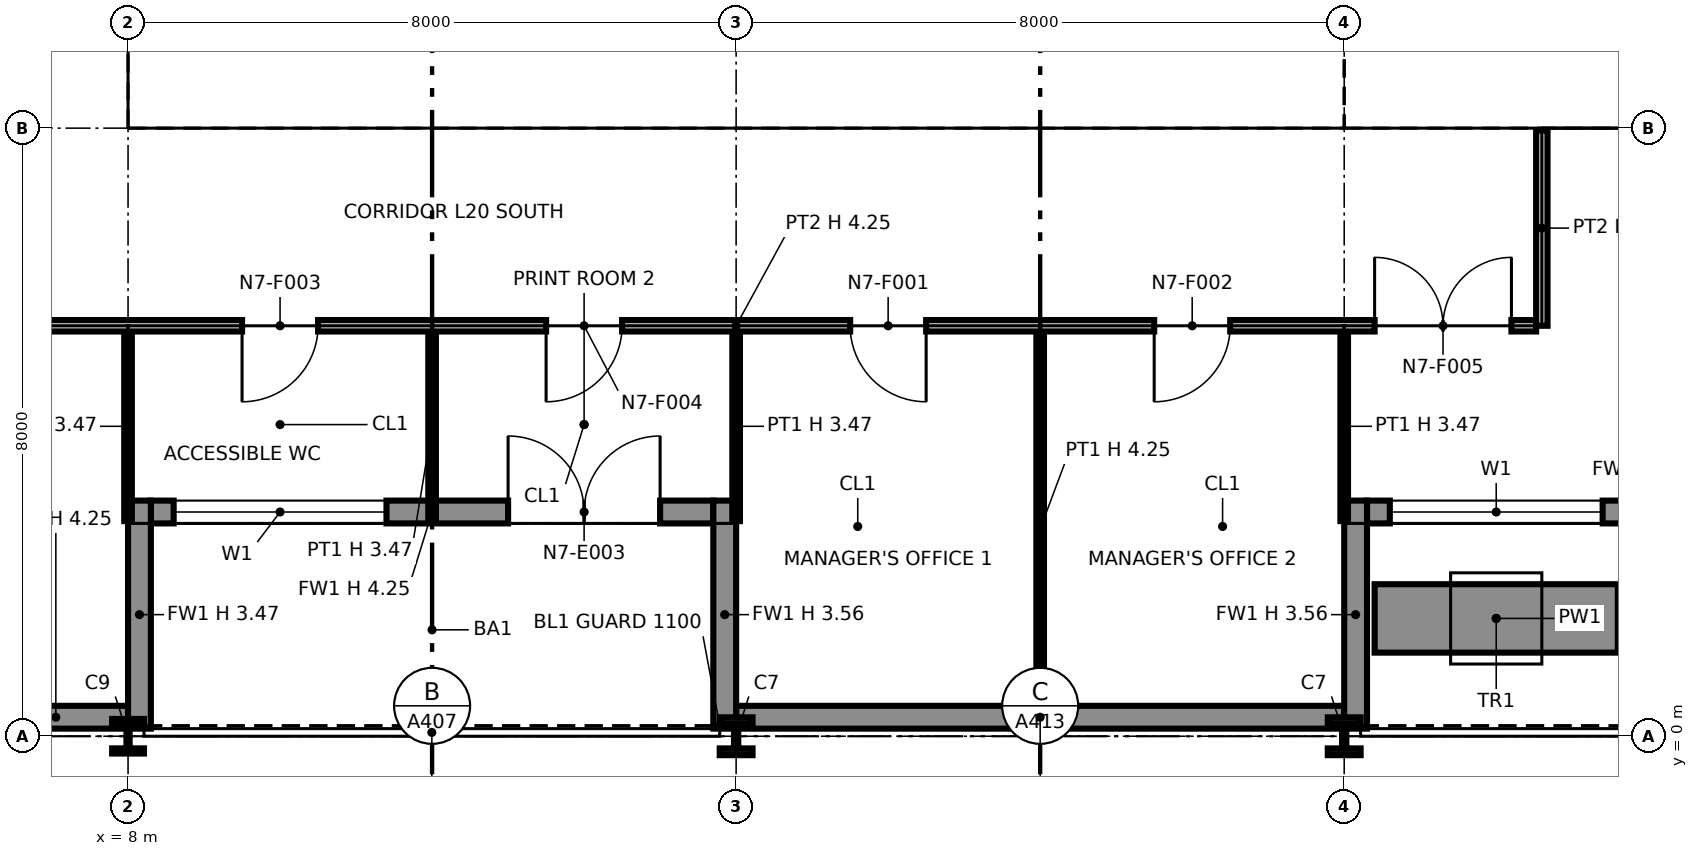
"""IFC4 building model, lengths in metres.
Left out: names, types, materials, properties, quantities, classifications, styles, units other than length and angle.
Written with IfcOpenShell. Run it as: python <this file> out.ifc"""

import sys

from ifc_helpers import new_model, si_unit, direction, frame, frame_2d, origin, origin_2d, place, context, subcontext, project, spatial, polyline, rectangle, i_section, outline, extrude, element, fill, save


model = new_model("IFC4")
c1 = context("Model", 3, precision=1e-05, world=origin(), true_north=direction((0.0, 1.0)))
c2 = subcontext(c1, "Body", "Model", "MODEL_VIEW")
j1 = project(units=[si_unit("LENGTHUNIT", "METRE"), si_unit("PLANEANGLEUNIT", "RADIAN")], contexts=[c1])
p1 = place(None, origin())
s1 = spatial("IfcSite", under=j1, at=p1, CompositionType="ELEMENT")
p2 = place(p1, origin())
s2 = spatial("IfcBuilding", under=s1, at=p2, CompositionType="ELEMENT")
p3 = place(p2, frame((0.0, 0.0, 105.2)))
s3 = spatial("IfcBuildingStorey", under=s2, at=p3, CompositionType="ELEMENT", Elevation=105.2)
p4 = place(p3, frame((8.0, 0.0, 0.0), z_axis=(0.0, 0.0, 1.0), x_axis=(1.0, 0.0, 0.0)))
e1 = element("IfcColumn", 1, at=p4, inside=s3, PredefinedType="COLUMN", context=c2, shape_type="SweptSolid", body=[
    extrude(i_section(OverallWidth=0.419, OverallDepth=0.455, WebThickness=0.042, FlangeThickness=0.068, at=origin_2d()), origin(), (0.0, 0.0, 1.0), 4.25),
])
p5 = place(p3, frame((8.0, 8.0, 0.0), z_axis=(0.0, 0.0, 1.0), x_axis=(1.0, 0.0, 0.0)))
e2 = element("IfcColumn", 2, at=p5, inside=s3, PredefinedType="COLUMN", context=c2, shape_type="SweptSolid", body=[
    extrude(i_section(OverallWidth=0.406, OverallDepth=0.417, WebThickness=0.03, FlangeThickness=0.048, at=origin_2d()), origin(), (0.0, 0.0, 1.0), 4.25),
])
p6 = place(p3, frame((16.0, 0.0, 0.0), z_axis=(0.0, 0.0, 1.0), x_axis=(1.0, 0.0, 0.0)))
e3 = element("IfcColumn", 3, at=p6, inside=s3, PredefinedType="COLUMN", context=c2, shape_type="SweptSolid", body=[
    extrude(i_section(OverallWidth=0.432, OverallDepth=0.498, WebThickness=0.056, FlangeThickness=0.089, at=origin_2d()), origin(), (0.0, 0.0, 1.0), 4.25),
])
p7 = place(p3, frame((16.0, 8.0, 0.0), z_axis=(0.0, 0.0, 1.0), x_axis=(1.0, 0.0, 0.0)))
e4 = element("IfcColumn", 4, at=p7, inside=s3, PredefinedType="COLUMN", context=c2, shape_type="SweptSolid", body=[
    extrude(i_section(OverallWidth=0.406, OverallDepth=0.417, WebThickness=0.03, FlangeThickness=0.048, at=origin_2d()), origin(), (0.0, 0.0, 1.0), 4.25),
])
p8 = place(p3, frame((24.0, 0.0, 0.0), z_axis=(0.0, 0.0, 1.0), x_axis=(1.0, 0.0, 0.0)))
e5 = element("IfcColumn", 5, at=p8, inside=s3, PredefinedType="COLUMN", context=c2, shape_type="SweptSolid", body=[
    extrude(i_section(OverallWidth=0.432, OverallDepth=0.498, WebThickness=0.056, FlangeThickness=0.089, at=origin_2d()), origin(), (0.0, 0.0, 1.0), 4.25),
])
p9 = place(p3, frame((24.0, 8.0, 0.0), z_axis=(0.0, 0.0, 1.0), x_axis=(1.0, 0.0, 0.0)))
e6 = element("IfcColumn", 6, at=p9, inside=s3, PredefinedType="COLUMN", context=c2, shape_type="SweptSolid", body=[
    extrude(i_section(OverallWidth=0.411, OverallDepth=0.434, WebThickness=0.036, FlangeThickness=0.057, at=origin_2d()), origin(), (0.0, 0.0, 1.0), 4.25),
])
p10 = place(p3, frame((6.1, 0.25, 0.0), z_axis=(0.0, 0.0, 1.0), x_axis=(1.0, 0.0, 0.0)))
e7 = element("IfcWall", 7, at=p10, inside=s3, PredefinedType="SOLIDWALL", context=c2, shape_type="SweptSolid", body=[
    extrude(rectangle(XDim=1.9, YDim=0.3, at=frame_2d((0.95, 0.0))), origin(), (0.0, 0.0, 1.0), 4.25),
])
p11 = place(p3, frame((8.3, 2.95, 0.0), z_axis=(0.0, 0.0, 1.0), x_axis=(1.0, 0.0, 0.0)))
e8 = element("IfcWall", 8, at=p11, inside=s3, PredefinedType="SOLIDWALL", context=c2, shape_type="SweptSolid", body=[
    extrude(rectangle(XDim=7.4, YDim=0.3, at=frame_2d((3.7, 0.0))), origin(), (0.0, 0.0, 1.0), 4.25),
])
p12 = place(p11, frame((0.3, 0.0, 0.9)))
e9 = element("IfcOpeningElement", 9, at=p12, cuts=e8, PredefinedType="OPENING", context=c2, shape_type="SweptSolid", body=[
    extrude(rectangle(XDim=2.8, YDim=2.2, at=frame_2d((1.4, 1.1))), frame((0.0, 0.16, 0.0), z_axis=(0.0, -1.0, 0.0), x_axis=(1.0, 0.0, 0.0)), (0.0, 0.0, 1.0), 0.32),
])
p13 = place(p11, frame((4.7, 0.0, 0.0)))
e10 = element("IfcOpeningElement", 10, at=p13, cuts=e8, PredefinedType="OPENING", context=c2, shape_type="SweptSolid", body=[
    extrude(rectangle(XDim=2.0, YDim=2.4, at=frame_2d((1.0, 1.2))), frame((0.0, 0.16, 0.0), z_axis=(0.0, -1.0, 0.0), x_axis=(1.0, 0.0, 0.0)), (0.0, 0.0, 1.0), 0.32),
])
p14 = place(p3, frame((8.15, 0.1, 0.0), z_axis=(0.0, 0.0, 1.0), x_axis=(0.0, 1.0, 0.0)))
e11 = element("IfcWall", 11, at=p14, inside=s3, PredefinedType="SOLIDWALL", context=c2, shape_type="SweptSolid", body=[
    extrude(rectangle(XDim=3.0, YDim=0.3, at=frame_2d((1.5, 0.0))), origin(), (0.0, 0.0, 1.0), 3.469),
])
p15 = place(p3, frame((15.85, 0.1, 0.0), z_axis=(0.0, 0.0, 1.0), x_axis=(0.0, 1.0, 0.0)))
e12 = element("IfcWall", 12, at=p15, inside=s3, PredefinedType="SOLIDWALL", context=c2, shape_type="SweptSolid", body=[
    extrude(rectangle(XDim=3.0, YDim=0.3, at=frame_2d((1.5, 0.0))), origin(), (0.0, 0.0, 1.0), 3.556),
])
p16 = place(p3, frame((16.0, 0.25, 0.0), z_axis=(0.0, 0.0, 1.0), x_axis=(1.0, 0.0, 0.0)))
e13 = element("IfcWall", 13, at=p16, inside=s3, PredefinedType="SOLIDWALL", context=c2, shape_type="SweptSolid", body=[
    extrude(rectangle(XDim=8.0, YDim=0.3, at=frame_2d((4.0, 0.0))), origin(), (0.0, 0.0, 1.0), 4.25),
])
p17 = place(p3, frame((24.3, 2.95, 0.0), z_axis=(0.0, 0.0, 1.0), x_axis=(1.0, 0.0, 0.0)))
e14 = element("IfcWall", 14, at=p17, inside=s3, PredefinedType="SOLIDWALL", context=c2, shape_type="SweptSolid", body=[
    extrude(rectangle(XDim=7.4, YDim=0.3, at=frame_2d((3.7, 0.0))), origin(), (0.0, 0.0, 1.0), 4.25),
])
p18 = place(p17, frame((0.3, 0.0, 0.9)))
e15 = element("IfcOpeningElement", 15, at=p18, cuts=e14, PredefinedType="OPENING", context=c2, shape_type="SweptSolid", body=[
    extrude(rectangle(XDim=2.8, YDim=2.2, at=frame_2d((1.4, 1.1))), frame((0.0, 0.16, 0.0), z_axis=(0.0, -1.0, 0.0), x_axis=(1.0, 0.0, 0.0)), (0.0, 0.0, 1.0), 0.32),
])
p19 = place(p17, frame((4.7, 0.0, 0.0)))
e16 = element("IfcOpeningElement", 16, at=p19, cuts=e14, PredefinedType="OPENING", context=c2, shape_type="SweptSolid", body=[
    extrude(rectangle(XDim=2.0, YDim=2.4, at=frame_2d((1.0, 1.2))), frame((0.0, 0.16, 0.0), z_axis=(0.0, -1.0, 0.0), x_axis=(1.0, 0.0, 0.0)), (0.0, 0.0, 1.0), 0.32),
])
p20 = place(p3, frame((24.15, 0.1, 0.0), z_axis=(0.0, 0.0, 1.0), x_axis=(0.0, 1.0, 0.0)))
e17 = element("IfcWall", 17, at=p20, inside=s3, PredefinedType="SOLIDWALL", context=c2, shape_type="SweptSolid", body=[
    extrude(rectangle(XDim=3.0, YDim=0.3, at=frame_2d((1.5, 0.0))), origin(), (0.0, 0.0, 1.0), 3.556),
])
p21 = place(p3, frame((24.4, 1.55, 0.0), z_axis=(0.0, 0.0, 1.0), x_axis=(1.0, 0.0, 0.0)))
e18 = element("IfcWall", 18, at=p21, inside=s3, PredefinedType="SOLIDWALL", context=c2, shape_type="SweptSolid", body=[
    extrude(rectangle(XDim=3.2, YDim=0.9, at=frame_2d((1.6, 0.0))), origin(), (0.0, 0.0, 1.0), 0.6),
])
p22 = place(p3, frame((8.65, 8.75, 0.0), z_axis=(0.0, 0.0, 1.0), x_axis=(1.0, 0.0, 0.0)))
e19 = element("IfcWall", 19, at=p22, inside=s3, PredefinedType="PARTITIONING", context=c2, shape_type="SweptSolid", body=[
    extrude(outline(polyline([(0.0, 0.0), (14.7, 0.0), (14.7, 4.25), (7.469, 4.25), (7.469, 3.632), (7.231, 3.632), (7.23, 4.25), (0.0, 4.25), (0.0, 0.0)])), frame((0.0, 0.1, 0.0), z_axis=(0.0, -1.0, 0.0), x_axis=(1.0, 0.0, 0.0)), (0.0, 0.0, 1.0), 0.2),
])
p23 = place(p22, frame((1.3, 0.0, 0.0)))
e20 = element("IfcOpeningElement", 20, at=p23, cuts=e19, PredefinedType="OPENING", context=c2, shape_type="SweptSolid", body=[
    extrude(rectangle(XDim=1.4, YDim=2.1, at=frame_2d((0.7, 1.05))), frame((0.0, 0.11, 0.0), z_axis=(0.0, -1.0, 0.0), x_axis=(1.0, 0.0, 0.0)), (0.0, 0.0, 1.0), 0.22),
])
p24 = place(p22, frame((4.6, 0.0, 0.0)))
e21 = element("IfcOpeningElement", 21, at=p24, cuts=e19, PredefinedType="OPENING", context=c2, shape_type="SweptSolid", body=[
    extrude(rectangle(XDim=1.4, YDim=2.1, at=frame_2d((0.7, 1.05))), frame((0.0, 0.11, 0.0), z_axis=(0.0, -1.0, 0.0), x_axis=(1.0, 0.0, 0.0)), (0.0, 0.0, 1.0), 0.22),
])
p25 = place(p22, frame((10.4, 0.0, 0.0)))
e22 = element("IfcOpeningElement", 22, at=p25, cuts=e19, PredefinedType="OPENING", context=c2, shape_type="SweptSolid", body=[
    extrude(rectangle(XDim=1.2, YDim=2.1, at=frame_2d((0.6, 1.05))), frame((0.0, 0.11, 0.0), z_axis=(0.0, -1.0, 0.0), x_axis=(1.0, 0.0, 0.0)), (0.0, 0.0, 1.0), 0.22),
])
p26 = place(p3, frame((8.75, 8.85, 0.0), z_axis=(0.0, 0.0, 1.0), x_axis=(0.0, 1.0, 0.0)))
e23 = element("IfcWall", 23, at=p26, inside=s3, PredefinedType="PARTITIONING", context=c2, shape_type="SweptSolid", body=[
    extrude(outline(polyline([(0.0, 0.0), (14.3, 0.0), (14.3, 4.25), (10.231, 4.25), (10.23, 3.789), (10.07, 3.789), (10.069, 4.25), (7.27, 4.25), (7.269, 3.632), (7.031, 3.632), (7.031, 4.25), (0.0, 4.25), (0.0, 0.0)])), frame((0.0, 0.1, 0.0), z_axis=(0.0, -1.0, 0.0), x_axis=(1.0, 0.0, 0.0)), (0.0, 0.0, 1.0), 0.2),
])
p27 = place(p26, frame((8.3, 0.0, 0.0)))
e24 = element("IfcOpeningElement", 24, at=p27, cuts=e23, PredefinedType="OPENING", context=c2, shape_type="SweptSolid", body=[
    extrude(rectangle(XDim=1.8, YDim=2.1, at=frame_2d((0.9, 1.05))), frame((0.0, 0.11, 0.0), z_axis=(0.0, -1.0, 0.0), x_axis=(1.0, 0.0, 0.0)), (0.0, 0.0, 1.0), 0.22),
])
p28 = place(p3, frame((12.4, 8.85, 0.0), z_axis=(0.0, 0.0, 1.0), x_axis=(0.0, 1.0, 0.0)))
e25 = element("IfcWall", 25, at=p28, inside=s3, PredefinedType="PARTITIONING", context=c2, shape_type="SweptSolid", body=[
    extrude(rectangle(XDim=6.85, YDim=0.2, at=frame_2d((3.425, 0.0))), origin(), (0.0, 0.0, 1.0), 4.25),
])
p29 = place(p3, frame((15.85, 8.85, 0.0), z_axis=(0.0, 0.0, 1.0), x_axis=(0.0, 1.0, 0.0)))
e26 = element("IfcWall", 26, at=p29, inside=s3, PredefinedType="PARTITIONING", context=c2, shape_type="SweptSolid", body=[
    extrude(rectangle(XDim=1.55, YDim=0.9, at=frame_2d((0.775, 0.0))), origin(), (0.0, 0.0, 1.0), 3.632),
])
p30 = place(p29, frame((0.3, 0.0, 0.0)))
e27 = element("IfcOpeningElement", 27, at=p30, cuts=e26, PredefinedType="OPENING", context=c2, shape_type="SweptSolid", body=[
    extrude(rectangle(XDim=1.1, YDim=2.1, at=frame_2d((0.55, 1.05))), frame((0.0, 0.46, 0.0), z_axis=(0.0, -1.0, 0.0), x_axis=(1.0, 0.0, 0.0)), (0.0, 0.0, 1.0), 0.92),
])
p31 = place(p3, frame((23.25, 8.85, 0.0), z_axis=(0.0, 0.0, 1.0), x_axis=(0.0, 1.0, 0.0)))
e28 = element("IfcWall", 28, at=p31, inside=s3, PredefinedType="PARTITIONING", context=c2, shape_type="SweptSolid", body=[
    extrude(outline(polyline([(0.0, 0.0), (14.3, 0.0), (14.3, 4.25), (11.231, 4.25), (11.23, 3.789), (11.07, 3.789), (11.069, 4.25), (7.27, 4.25), (7.269, 3.632), (7.031, 3.632), (7.031, 4.25), (1.231, 4.25), (1.23, 3.789), (1.07, 3.789), (1.069, 4.25), (0.0, 4.25), (0.0, 0.0)])), frame((0.0, 0.1, 0.0), z_axis=(0.0, -1.0, 0.0), x_axis=(1.0, 0.0, 0.0)), (0.0, 0.0, 1.0), 0.2),
])
p32 = place(p31, frame((8.3, 0.0, 0.0)))
e29 = element("IfcOpeningElement", 29, at=p32, cuts=e28, PredefinedType="OPENING", context=c2, shape_type="SweptSolid", body=[
    extrude(rectangle(XDim=1.8, YDim=2.1, at=frame_2d((0.9, 1.05))), frame((0.0, 0.11, 0.0), z_axis=(0.0, -1.0, 0.0), x_axis=(1.0, 0.0, 0.0)), (0.0, 0.0, 1.0), 0.22),
])
p33 = place(p3, frame((24.65, 8.75, 0.0), z_axis=(0.0, 0.0, 1.0), x_axis=(1.0, 0.0, 0.0)))
e30 = element("IfcWall", 30, at=p33, inside=s3, PredefinedType="PARTITIONING", context=c2, shape_type="SweptSolid", body=[
    extrude(outline(polyline([(0.0, 0.0), (14.7, 0.0), (14.7, 4.25), (7.469, 4.25), (7.469, 3.632), (7.231, 3.632), (7.23, 4.25), (0.0, 4.25), (0.0, 0.0)])), frame((0.0, 0.1, 0.0), z_axis=(0.0, -1.0, 0.0), x_axis=(1.0, 0.0, 0.0)), (0.0, 0.0, 1.0), 0.2),
])
p34 = place(p3, frame((24.75, 8.85, 0.0), z_axis=(0.0, 0.0, 1.0), x_axis=(0.0, 1.0, 0.0)))
e31 = element("IfcWall", 31, at=p34, inside=s3, PredefinedType="PARTITIONING", context=c2, shape_type="SweptSolid", body=[
    extrude(outline(polyline([(0.0, 0.0), (6.3, 0.0), (6.3, 4.25), (3.231, 4.25), (3.23, 3.789), (3.07, 3.789), (3.069, 4.25), (0.0, 4.25), (0.0, 0.0)])), frame((0.0, 0.1, 0.0), z_axis=(0.0, -1.0, 0.0), x_axis=(1.0, 0.0, 0.0)), (0.0, 0.0, 1.0), 0.2),
])
p35 = place(p3, frame((27.075, 8.85, 0.0), z_axis=(0.0, 0.0, 1.0), x_axis=(0.0, 1.0, 0.0)))
e32 = element("IfcWall", 32, at=p35, inside=s3, PredefinedType="PARTITIONING", context=c2, shape_type="SweptSolid", body=[
    extrude(rectangle(XDim=3.0, YDim=0.15, at=frame_2d((1.5, 0.0))), origin(), (0.0, 0.0, 1.0), 4.25),
])
p36 = place(p3, frame((20.0, 0.13, 0.0), z_axis=(0.0, 0.0, 1.0), x_axis=(0.0, 1.0, 0.0)))
e33 = element("IfcWall", 33, at=p36, inside=s3, PredefinedType="PARTITIONING", context=c2, shape_type="SweptSolid", body=[
    extrude(outline(polyline([(0.0, 0.0), (5.195, 0.0), (5.195, 4.25), (4.17, 4.25), (4.168, 3.47), (3.572, 3.47), (3.57, 4.25), (0.0, 4.25), (0.0, 0.0)])), frame((0.0, 0.05, 0.0), z_axis=(0.0, -1.0, 0.0), x_axis=(1.0, 0.0, 0.0)), (0.0, 0.0, 1.0), 0.1),
])
for number, where, z_axis, x_axis in (
    (34, (8.0, 2.83, 0.0), (0.0, 0.0, 1.0), (0.0, 1.0, 0.0)),
    (35, (12.0, 2.83, 0.0), (0.0, 0.0, 1.0), (0.0, 1.0, 0.0)),
    (36, (16.0, 2.83, 0.0), (0.0, 0.0, 1.0), (0.0, 1.0, 0.0)),
    (37, (24.0, 2.83, 0.0), (0.0, 0.0, 1.0), (0.0, 1.0, 0.0)),
):
    element("IfcWall", number, at=place(p3, frame(where, z_axis=z_axis, x_axis=x_axis)), inside=s3, PredefinedType="PARTITIONING", context=c2, shape_type="SweptSolid", body=[
        extrude(rectangle(XDim=2.495, YDim=0.1, at=frame_2d((1.248, 0.0))), origin(), (0.0, 0.0, 1.0), 3.47),
    ])
p37 = place(p3, frame((5.475, 5.4, 0.0), z_axis=(0.0, 0.0, 1.0), x_axis=(1.0, 0.0, 0.0)))
e38 = element("IfcWall", 38, at=p37, inside=s3, PredefinedType="PARTITIONING", context=c2, shape_type="SweptSolid", body=[
    extrude(rectangle(XDim=21.05, YDim=0.15, at=frame_2d((10.525, 0.0))), origin(), (0.0, 0.0, 1.0), 4.25),
])
p38 = place(p37, frame((13.025, 0.0, 0.0), z_axis=(0.0, 0.0, 1.0), x_axis=(-1.0, 0.0, 0.0)))
e39 = element("IfcOpeningElement", 39, at=p38, cuts=e38, PredefinedType="OPENING", context=c2, shape_type="SweptSolid", body=[
    extrude(rectangle(XDim=1.0, YDim=2.1, at=frame_2d((0.5, 1.05))), frame((0.0, 0.085, 0.0), z_axis=(0.0, -1.0, 0.0), x_axis=(1.0, 0.0, 0.0)), (0.0, 0.0, 1.0), 0.17),
])
p39 = place(p37, frame((17.025, 0.0, 0.0), z_axis=(0.0, 0.0, 1.0), x_axis=(-1.0, 0.0, 0.0)))
e40 = element("IfcOpeningElement", 40, at=p39, cuts=e38, PredefinedType="OPENING", context=c2, shape_type="SweptSolid", body=[
    extrude(rectangle(XDim=1.0, YDim=2.1, at=frame_2d((0.5, 1.05))), frame((0.0, 0.085, 0.0), z_axis=(0.0, -1.0, 0.0), x_axis=(1.0, 0.0, 0.0)), (0.0, 0.0, 1.0), 0.17),
])
p40 = place(p37, frame((5.025, 0.0, 0.0), z_axis=(0.0, 0.0, 1.0), x_axis=(-1.0, 0.0, 0.0)))
e41 = element("IfcOpeningElement", 41, at=p40, cuts=e38, PredefinedType="OPENING", context=c2, shape_type="SweptSolid", body=[
    extrude(rectangle(XDim=1.0, YDim=2.1, at=frame_2d((0.5, 1.05))), frame((0.0, 0.085, 0.0), z_axis=(0.0, -1.0, 0.0), x_axis=(1.0, 0.0, 0.0)), (0.0, 0.0, 1.0), 0.17),
])
p41 = place(p37, frame((9.025, 0.0, 0.0), z_axis=(0.0, 0.0, 1.0), x_axis=(-1.0, 0.0, 0.0)))
e42 = element("IfcOpeningElement", 42, at=p41, cuts=e38, PredefinedType="OPENING", context=c2, shape_type="SweptSolid", body=[
    extrude(rectangle(XDim=1.0, YDim=2.1, at=frame_2d((0.5, 1.05))), frame((0.0, 0.085, 0.0), z_axis=(0.0, -1.0, 0.0), x_axis=(1.0, 0.0, 0.0)), (0.0, 0.0, 1.0), 0.17),
])
p42 = place(p37, frame((18.925, 0.0, 0.0)))
e43 = element("IfcOpeningElement", 43, at=p42, cuts=e38, PredefinedType="OPENING", context=c2, shape_type="SweptSolid", body=[
    extrude(rectangle(XDim=1.8, YDim=2.1, at=frame_2d((0.9, 1.05))), frame((0.0, 0.085, 0.0), z_axis=(0.0, -1.0, 0.0), x_axis=(1.0, 0.0, 0.0)), (0.0, 0.0, 1.0), 0.17),
])
p43 = place(p3, frame((26.6, 5.4, 0.0), z_axis=(0.0, 0.0, 1.0), x_axis=(0.0, 1.0, 0.0)))
e44 = element("IfcWall", 44, at=p43, inside=s3, PredefinedType="PARTITIONING", context=c2, shape_type="SweptSolid", body=[
    extrude(rectangle(XDim=2.57, YDim=0.15, at=frame_2d((1.285, 0.0))), origin(), (0.0, 0.0, 1.0), 4.25),
])
p44 = place(p12, origin())
e45 = element("IfcWindow", 45, at=p44, inside=s3, PartitioningType="SINGLE_PANEL", PredefinedType="WINDOW", context=c2, shape_type="SweptSolid", body=[
    extrude(rectangle(XDim=2.8, YDim=2.2, at=frame_2d((1.4, 1.1))), frame((0.0, 0.03, 0.0), z_axis=(0.0, -1.0, 0.0), x_axis=(1.0, 0.0, 0.0)), (0.0, 0.0, 1.0), 0.06),
])
fill(e9, e45)
p45 = place(p13, origin())
e46 = element("IfcDoor", 46, at=p45, inside=s3, OperationType="DOUBLE_DOOR_SINGLE_SWING", PredefinedType="DOOR", context=c2, shape_type="SweptSolid", body=[
    extrude(rectangle(XDim=2.0, YDim=2.4, at=frame_2d((1.0, 1.2))), frame((0.0, 0.025, 0.0), z_axis=(0.0, -1.0, 0.0), x_axis=(1.0, 0.0, 0.0)), (0.0, 0.0, 1.0), 0.05),
])
fill(e10, e46)
p46 = place(p18, origin())
e47 = element("IfcWindow", 47, at=p46, inside=s3, PartitioningType="SINGLE_PANEL", PredefinedType="WINDOW", context=c2, shape_type="SweptSolid", body=[
    extrude(rectangle(XDim=2.8, YDim=2.2, at=frame_2d((1.4, 1.1))), frame((0.0, 0.03, 0.0), z_axis=(0.0, -1.0, 0.0), x_axis=(1.0, 0.0, 0.0)), (0.0, 0.0, 1.0), 0.06),
])
fill(e15, e47)
p47 = place(p23, origin())
e48 = element("IfcDoor", 48, at=p47, inside=s3, OperationType="DOUBLE_DOOR_SINGLE_SWING", PredefinedType="NOTDEFINED", context=c2, shape_type="SweptSolid", body=[
    extrude(rectangle(XDim=1.4, YDim=2.1, at=frame_2d((0.7, 1.05))), frame((0.0, 0.025, 0.0), z_axis=(0.0, -1.0, 0.0), x_axis=(1.0, 0.0, 0.0)), (0.0, 0.0, 1.0), 0.05),
])
fill(e20, e48)
p48 = place(p24, origin())
e49 = element("IfcDoor", 49, at=p48, inside=s3, OperationType="DOUBLE_DOOR_SINGLE_SWING", PredefinedType="NOTDEFINED", context=c2, shape_type="SweptSolid", body=[
    extrude(rectangle(XDim=1.4, YDim=2.1, at=frame_2d((0.7, 1.05))), frame((0.0, 0.025, 0.0), z_axis=(0.0, -1.0, 0.0), x_axis=(1.0, 0.0, 0.0)), (0.0, 0.0, 1.0), 0.05),
])
fill(e21, e49)
p49 = place(p25, origin())
e50 = element("IfcDoor", 50, at=p49, inside=s3, OperationType="SINGLE_SWING_LEFT", PredefinedType="NOTDEFINED", context=c2, shape_type="SweptSolid", body=[
    extrude(rectangle(XDim=1.2, YDim=2.1, at=frame_2d((0.6, 1.05))), frame((0.0, 0.025, 0.0), z_axis=(0.0, -1.0, 0.0), x_axis=(1.0, 0.0, 0.0)), (0.0, 0.0, 1.0), 0.05),
])
fill(e22, e50)
p50 = place(p38, origin())
e51 = element("IfcDoor", 51, at=p50, inside=s3, OperationType="SINGLE_SWING_LEFT", PredefinedType="DOOR", context=c2, shape_type="SweptSolid", body=[
    extrude(rectangle(XDim=1.0, YDim=2.1, at=frame_2d((0.5, 1.05))), frame((0.0, 0.025, 0.0), z_axis=(0.0, -1.0, 0.0), x_axis=(1.0, 0.0, 0.0)), (0.0, 0.0, 1.0), 0.05),
])
fill(e39, e51)
p51 = place(p39, origin())
e52 = element("IfcDoor", 52, at=p51, inside=s3, OperationType="SINGLE_SWING_RIGHT", PredefinedType="DOOR", context=c2, shape_type="SweptSolid", body=[
    extrude(rectangle(XDim=1.0, YDim=2.1, at=frame_2d((0.5, 1.05))), frame((0.0, 0.025, 0.0), z_axis=(0.0, -1.0, 0.0), x_axis=(1.0, 0.0, 0.0)), (0.0, 0.0, 1.0), 0.05),
])
fill(e40, e52)
p52 = place(p40, origin())
e53 = element("IfcDoor", 53, at=p52, inside=s3, OperationType="SINGLE_SWING_RIGHT", PredefinedType="DOOR", context=c2, shape_type="SweptSolid", body=[
    extrude(rectangle(XDim=1.0, YDim=2.1, at=frame_2d((0.5, 1.05))), frame((0.0, 0.025, 0.0), z_axis=(0.0, -1.0, 0.0), x_axis=(1.0, 0.0, 0.0)), (0.0, 0.0, 1.0), 0.05),
])
fill(e41, e53)
p53 = place(p41, origin())
e54 = element("IfcDoor", 54, at=p53, inside=s3, OperationType="SINGLE_SWING_RIGHT", PredefinedType="DOOR", context=c2, shape_type="SweptSolid", body=[
    extrude(rectangle(XDim=1.0, YDim=2.1, at=frame_2d((0.5, 1.05))), frame((0.0, 0.025, 0.0), z_axis=(0.0, -1.0, 0.0), x_axis=(1.0, 0.0, 0.0)), (0.0, 0.0, 1.0), 0.05),
])
fill(e42, e54)
p54 = place(p42, origin())
e55 = element("IfcDoor", 55, at=p54, inside=s3, OperationType="DOUBLE_DOOR_SINGLE_SWING", PredefinedType="DOOR", context=c2, shape_type="SweptSolid", body=[
    extrude(rectangle(XDim=1.8, YDim=2.1, at=frame_2d((0.9, 1.05))), frame((0.0, 0.025, 0.0), z_axis=(0.0, -1.0, 0.0), x_axis=(1.0, 0.0, 0.0)), (0.0, 0.0, 1.0), 0.05),
])
fill(e43, e55)
save(model, sys.argv[1])
